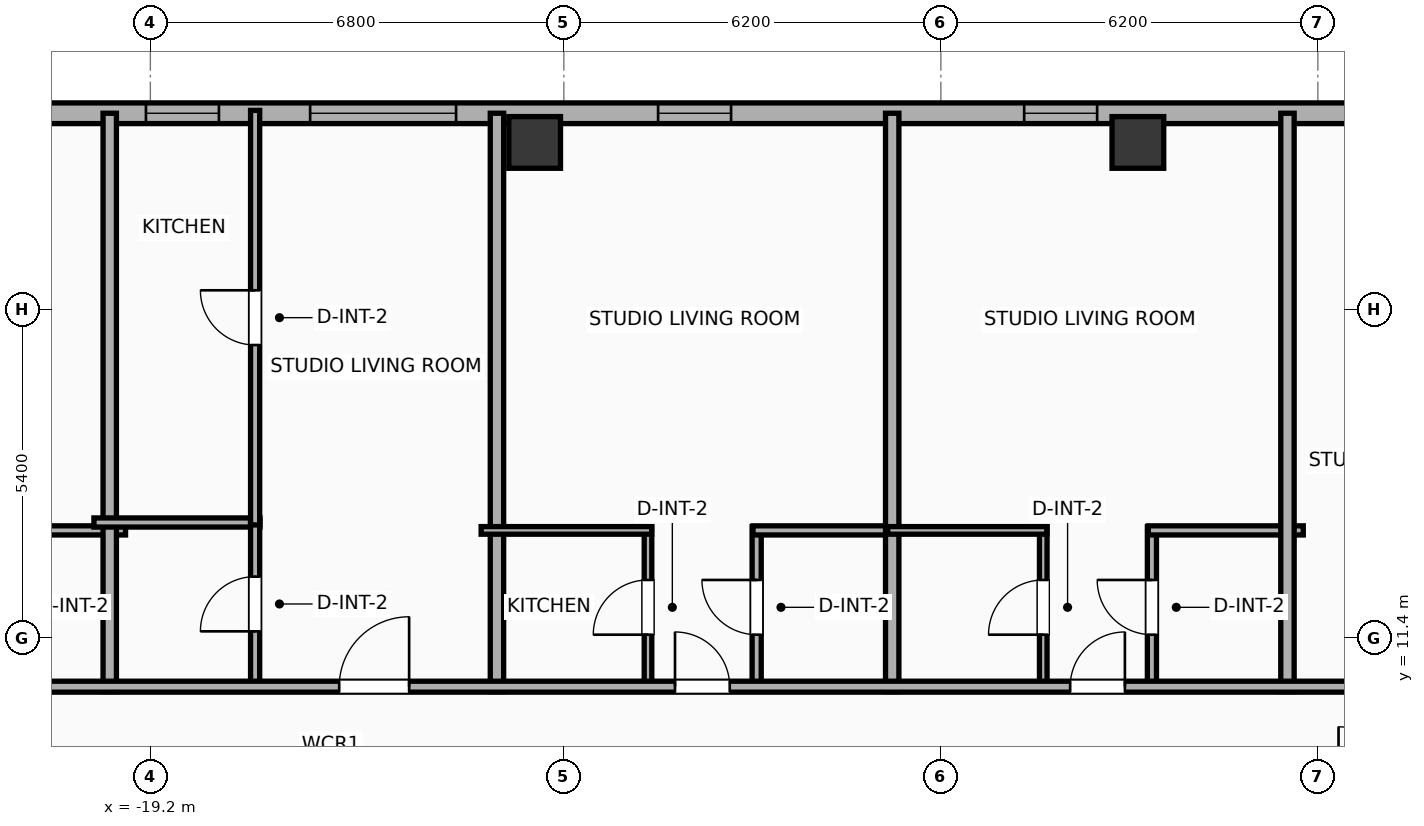
"""IFC4 building model, lengths in metres.
Left out: names, types, materials, properties, quantities, classifications, styles, units other than length and angle.
Written with IfcOpenShell. Run it as: python <this file> out.ifc"""

import sys

from ifc_helpers import new_model, si_unit, direction, frame, frame_2d, origin, origin_2d, place, context, subcontext, project, spatial, rectangle, hollow_rectangle, extrude, element, fill, save


model = new_model("IFC4")
c1 = context("Model", 3, precision=1e-05, world=origin(), true_north=direction((0.0, 1.0)))
c2 = subcontext(c1, "Body", "Model", "MODEL_VIEW")
j1 = project(units=[si_unit("LENGTHUNIT", "METRE"), si_unit("PLANEANGLEUNIT", "RADIAN")], contexts=[c1])
p1 = place(None, origin())
s1 = spatial("IfcSite", under=j1, at=p1, CompositionType="ELEMENT")
p2 = place(p1, origin())
s2 = spatial("IfcBuilding", under=s1, at=p2, CompositionType="ELEMENT")
p3 = place(p2, frame((0.0, 0.0, 247.0)))
s3 = spatial("IfcBuildingStorey", under=s2, at=p3, CompositionType="ELEMENT", Elevation=247.0)
for number, where, z_axis, x_axis in (
    (1, (-2.96, 19.55, 0.0), (0.0, 0.0, 1.0), (1.0, 0.0, 0.0)),
    (2, (-12.88, 19.55, 0.0), (0.0, 0.0, 1.0), (1.0, 0.0, 0.0)),
):
    element("IfcColumn", number, at=place(p3, frame(where, z_axis=z_axis, x_axis=x_axis)), inside=s3, PredefinedType="COLUMN", context=c2, shape_type="SweptSolid", body=[
        extrude(hollow_rectangle(XDim=0.85, YDim=0.85, WallThickness=0.028, at=origin_2d()), origin(), (0.0, 0.0, 1.0), 3.9),
    ])
p4 = place(p3, frame((-22.783, 20.03, 0.0), z_axis=(0.0, 0.0, 1.0), x_axis=(1.0, 0.0, 0.0)))
e3 = element("IfcWall", 3, at=p4, inside=s3, PredefinedType="ELEMENTEDWALL", context=c2, shape_type="SweptSolid", body=[
    extrude(rectangle(XDim=49.566, YDim=0.34, at=frame_2d((24.783, 0.0))), origin(), (0.0, 0.0, 1.0), 3.65),
])
p5 = place(p4, frame((6.211, 0.0, 0.75)))
e4 = element("IfcOpeningElement", 4, at=p5, cuts=e3, PredefinedType="OPENING", context=c2, shape_type="SweptSolid", body=[
    extrude(rectangle(XDim=2.4, YDim=2.1, at=frame_2d((1.2, 1.05))), frame((0.0, 0.18, 0.0), z_axis=(0.0, -1.0, 0.0), x_axis=(1.0, 0.0, 0.0)), (0.0, 0.0, 1.0), 0.36),
])
p6 = place(p4, frame((23.583, 0.0, 0.75)))
e5 = element("IfcOpeningElement", 5, at=p6, cuts=e3, PredefinedType="OPENING", context=c2, shape_type="SweptSolid", body=[
    extrude(rectangle(XDim=2.4, YDim=2.1, at=frame_2d((1.2, 1.05))), frame((0.0, 0.18, 0.0), z_axis=(0.0, -1.0, 0.0), x_axis=(1.0, 0.0, 0.0)), (0.0, 0.0, 1.0), 0.36),
])
p7 = place(p4, frame((41.756, 0.0, 0.75)))
e6 = element("IfcOpeningElement", 6, at=p7, cuts=e3, PredefinedType="OPENING", context=c2, shape_type="SweptSolid", body=[
    extrude(rectangle(XDim=2.4, YDim=2.1, at=frame_2d((1.2, 1.05))), frame((0.0, 0.18, 0.0), z_axis=(0.0, -1.0, 0.0), x_axis=(1.0, 0.0, 0.0)), (0.0, 0.0, 1.0), 0.36),
])
p8 = place(p4, frame((3.511, 0.0, 0.75)))
e7 = element("IfcOpeningElement", 7, at=p8, cuts=e3, PredefinedType="OPENING", context=c2, shape_type="SweptSolid", body=[
    extrude(rectangle(XDim=1.2, YDim=2.05, at=frame_2d((0.6, 1.025))), frame((0.0, 0.18, 0.0), z_axis=(0.0, -1.0, 0.0), x_axis=(1.0, 0.0, 0.0)), (0.0, 0.0, 1.0), 0.36),
])
p9 = place(p4, frame((11.933, 0.0, 0.75)))
e8 = element("IfcOpeningElement", 8, at=p9, cuts=e3, PredefinedType="OPENING", context=c2, shape_type="SweptSolid", body=[
    extrude(rectangle(XDim=1.2, YDim=2.05, at=frame_2d((0.6, 1.025))), frame((0.0, 0.18, 0.0), z_axis=(0.0, -1.0, 0.0), x_axis=(1.0, 0.0, 0.0)), (0.0, 0.0, 1.0), 0.36),
])
p10 = place(p4, frame((17.953, 0.0, 0.75)))
e9 = element("IfcOpeningElement", 9, at=p10, cuts=e3, PredefinedType="OPENING", context=c2, shape_type="SweptSolid", body=[
    extrude(rectangle(XDim=1.2, YDim=2.05, at=frame_2d((0.6, 1.025))), frame((0.0, 0.18, 0.0), z_axis=(0.0, -1.0, 0.0), x_axis=(1.0, 0.0, 0.0)), (0.0, 0.0, 1.0), 0.36),
])
p11 = place(p4, frame((27.018, 0.0, 0.75)))
e10 = element("IfcOpeningElement", 10, at=p11, cuts=e3, PredefinedType="OPENING", context=c2, shape_type="SweptSolid", body=[
    extrude(rectangle(XDim=1.2, YDim=2.05, at=frame_2d((0.6, 1.025))), frame((0.0, 0.18, 0.0), z_axis=(0.0, -1.0, 0.0), x_axis=(1.0, 0.0, 0.0)), (0.0, 0.0, 1.0), 0.36),
])
p12 = place(p4, frame((30.368, 0.0, 0.75)))
e11 = element("IfcOpeningElement", 11, at=p12, cuts=e3, PredefinedType="OPENING", context=c2, shape_type="SweptSolid", body=[
    extrude(rectangle(XDim=1.2, YDim=2.05, at=frame_2d((0.6, 1.025))), frame((0.0, 0.18, 0.0), z_axis=(0.0, -1.0, 0.0), x_axis=(1.0, 0.0, 0.0)), (0.0, 0.0, 1.0), 0.36),
])
p13 = place(p4, frame((33.378, 0.0, 0.75)))
e12 = element("IfcOpeningElement", 12, at=p13, cuts=e3, PredefinedType="OPENING", context=c2, shape_type="SweptSolid", body=[
    extrude(rectangle(XDim=1.2, YDim=2.05, at=frame_2d((0.6, 1.025))), frame((0.0, 0.18, 0.0), z_axis=(0.0, -1.0, 0.0), x_axis=(1.0, 0.0, 0.0)), (0.0, 0.0, 1.0), 0.36),
])
p14 = place(p4, frame((37.639, 0.0, 0.75)))
e13 = element("IfcOpeningElement", 13, at=p14, cuts=e3, PredefinedType="OPENING", context=c2, shape_type="SweptSolid", body=[
    extrude(rectangle(XDim=1.2, YDim=2.05, at=frame_2d((0.6, 1.025))), frame((0.0, 0.18, 0.0), z_axis=(0.0, -1.0, 0.0), x_axis=(1.0, 0.0, 0.0)), (0.0, 0.0, 1.0), 0.36),
])
p15 = place(p4, frame((45.25, 0.0, 0.75)))
e14 = element("IfcOpeningElement", 14, at=p15, cuts=e3, PredefinedType="OPENING", context=c2, shape_type="SweptSolid", body=[
    extrude(rectangle(XDim=1.2, YDim=2.05, at=frame_2d((0.6, 1.025))), frame((0.0, 0.18, 0.0), z_axis=(0.0, -1.0, 0.0), x_axis=(1.0, 0.0, 0.0)), (0.0, 0.0, 1.0), 0.36),
])
p16 = place(p4, frame((47.292, 0.0, 0.75)))
e15 = element("IfcOpeningElement", 15, at=p16, cuts=e3, PredefinedType="OPENING", context=c2, shape_type="SweptSolid", body=[
    extrude(rectangle(XDim=1.2, YDim=2.05, at=frame_2d((0.6, 1.025))), frame((0.0, 0.18, 0.0), z_axis=(0.0, -1.0, 0.0), x_axis=(1.0, 0.0, 0.0)), (0.0, 0.0, 1.0), 0.36),
])
p17 = place(p3, frame((-22.133, 13.17, 0.0), z_axis=(0.0, 0.0, 1.0), x_axis=(1.0, 0.0, 0.0)))
e16 = element("IfcWall", 16, at=p17, inside=s3, PredefinedType="PLUMBINGWALL", context=c2, shape_type="SweptSolid", body=[
    extrude(rectangle(XDim=2.525, YDim=0.15, at=frame_2d((1.263, 0.0))), origin(), (0.0, 0.0, 1.0), 3.65),
])
p18 = place(p3, frame((-19.868, 10.52, 0.0), z_axis=(0.0, 0.0, 1.0), x_axis=(0.0, 1.0, 0.0)))
e17 = element("IfcWall", 17, at=p18, inside=s3, PredefinedType="PARTITIONING", context=c2, shape_type="SweptSolid", body=[
    extrude(rectangle(XDim=9.51, YDim=0.22, at=frame_2d((4.755, 0.0))), origin(), (0.0, 0.0, 1.0), 3.65),
])
p19 = place(p3, frame((-20.128, 13.3, 0.0), z_axis=(0.0, 0.0, 1.0), x_axis=(1.0, 0.0, 0.0)))
e18 = element("IfcWall", 18, at=p19, inside=s3, PredefinedType="PLUMBINGWALL", context=c2, shape_type="SweptSolid", body=[
    extrude(rectangle(XDim=2.731, YDim=0.15, at=frame_2d((1.365, 0.0))), origin(), (0.0, 0.0, 1.0), 3.65),
])
p20 = place(p3, frame((-17.477, 10.58, 0.0), z_axis=(0.0, 0.0, 1.0), x_axis=(0.0, 1.0, 0.0)))
e19 = element("IfcWall", 19, at=p20, inside=s3, PredefinedType="PLUMBINGWALL", context=c2, shape_type="SweptSolid", body=[
    extrude(rectangle(XDim=2.76, YDim=0.15, at=frame_2d((1.38, 0.0))), origin(), (0.0, 0.0, 1.0), 3.65),
])
p21 = place(p20, frame((0.93, 0.0, 0.0)))
e20 = element("IfcOpeningElement", 20, at=p21, cuts=e19, PredefinedType="OPENING", context=c2, shape_type="SweptSolid", body=[
    extrude(rectangle(XDim=0.9, YDim=2.05, at=frame_2d((0.45, 1.025))), frame((0.0, 0.085, 0.0), z_axis=(0.0, -1.0, 0.0), x_axis=(1.0, 0.0, 0.0)), (0.0, 0.0, 1.0), 0.17),
])
p22 = place(p3, frame((-17.477, 13.26, 0.0), z_axis=(0.0, 0.0, 1.0), x_axis=(0.0, 1.0, 0.0)))
e21 = element("IfcWall", 21, at=p22, inside=s3, PredefinedType="PLUMBINGWALL", context=c2, shape_type="SweptSolid", body=[
    extrude(rectangle(XDim=6.817, YDim=0.15, at=frame_2d((3.408, 0.0))), origin(), (0.0, 0.0, 1.0), 3.65),
])
p23 = place(p22, frame((2.958, 0.0, 0.0)))
e22 = element("IfcOpeningElement", 22, at=p23, cuts=e21, PredefinedType="OPENING", context=c2, shape_type="SweptSolid", body=[
    extrude(rectangle(XDim=0.9, YDim=2.05, at=frame_2d((0.45, 1.025))), frame((0.0, 0.085, 0.0), z_axis=(0.0, -1.0, 0.0), x_axis=(1.0, 0.0, 0.0)), (0.0, 0.0, 1.0), 0.17),
])
p24 = place(p3, frame((-13.5, 10.52, 0.0), z_axis=(0.0, 0.0, 1.0), x_axis=(0.0, 1.0, 0.0)))
e23 = element("IfcWall", 23, at=p24, inside=s3, PredefinedType="PARTITIONING", context=c2, shape_type="SweptSolid", body=[
    extrude(rectangle(XDim=9.51, YDim=0.22, at=frame_2d((4.755, 0.0))), origin(), (0.0, 0.0, 1.0), 3.65),
])
p25 = place(p3, frame((-11.016, 10.58, 0.0), z_axis=(0.0, 0.0, 1.0), x_axis=(0.0, 1.0, 0.0)))
e24 = element("IfcWall", 24, at=p25, inside=s3, PredefinedType="PARTITIONING", context=c2, shape_type="SweptSolid", body=[
    extrude(rectangle(XDim=2.65, YDim=0.125, at=frame_2d((1.325, 0.0))), origin(), (0.0, 0.0, 1.0), 3.65),
])
p26 = place(p25, frame((0.875, 0.0, 0.0)))
e25 = element("IfcOpeningElement", 25, at=p26, cuts=e24, PredefinedType="OPENING", context=c2, shape_type="SweptSolid", body=[
    extrude(rectangle(XDim=0.9, YDim=2.05, at=frame_2d((0.45, 1.025))), frame((0.0, 0.073, 0.0), z_axis=(0.0, -1.0, 0.0), x_axis=(1.0, 0.0, 0.0)), (0.0, 0.0, 1.0), 0.145),
])
p27 = place(p3, frame((-9.229, 10.58, 0.0), z_axis=(0.0, 0.0, 1.0), x_axis=(0.0, 1.0, 0.0)))
e26 = element("IfcWall", 26, at=p27, inside=s3, PredefinedType="PLUMBINGWALL", context=c2, shape_type="SweptSolid", body=[
    extrude(rectangle(XDim=2.65, YDim=0.15, at=frame_2d((1.325, 0.0))), origin(), (0.0, 0.0, 1.0), 3.65),
])
p28 = place(p27, frame((0.875, 0.0, 0.0)))
e27 = element("IfcOpeningElement", 27, at=p28, cuts=e26, PredefinedType="OPENING", context=c2, shape_type="SweptSolid", body=[
    extrude(rectangle(XDim=0.9, YDim=2.05, at=frame_2d((0.45, 1.025))), frame((0.0, 0.085, 0.0), z_axis=(0.0, -1.0, 0.0), x_axis=(1.0, 0.0, 0.0)), (0.0, 0.0, 1.0), 0.17),
])
p29 = place(p3, frame((-13.76, 13.17, 0.0), z_axis=(0.0, 0.0, 1.0), x_axis=(1.0, 0.0, 0.0)))
e28 = element("IfcWall", 28, at=p29, inside=s3, PredefinedType="PARTITIONING", context=c2, shape_type="SweptSolid", body=[
    extrude(rectangle(XDim=2.804, YDim=0.125, at=frame_2d((1.402, 0.0))), origin(), (0.0, 0.0, 1.0), 3.65),
])
p30 = place(p3, frame((-9.289, 13.17, 0.0), z_axis=(0.0, 0.0, 1.0), x_axis=(1.0, 0.0, 0.0)))
e29 = element("IfcWall", 29, at=p30, inside=s3, PredefinedType="PLUMBINGWALL", context=c2, shape_type="SweptSolid", body=[
    extrude(rectangle(XDim=2.364, YDim=0.15, at=frame_2d((1.182, 0.0))), origin(), (0.0, 0.0, 1.0), 3.65),
])
p31 = place(p3, frame((-7.0, 10.52, 0.0), z_axis=(0.0, 0.0, 1.0), x_axis=(0.0, 1.0, 0.0)))
e30 = element("IfcWall", 30, at=p31, inside=s3, PredefinedType="PARTITIONING", context=c2, shape_type="SweptSolid", body=[
    extrude(rectangle(XDim=9.51, YDim=0.22, at=frame_2d((4.755, 0.0))), origin(), (0.0, 0.0, 1.0), 3.65),
])
p32 = place(p3, frame((-4.516, 10.58, 0.0), z_axis=(0.0, 0.0, 1.0), x_axis=(0.0, 1.0, 0.0)))
e31 = element("IfcWall", 31, at=p32, inside=s3, PredefinedType="PARTITIONING", context=c2, shape_type="SweptSolid", body=[
    extrude(rectangle(XDim=2.65, YDim=0.125, at=frame_2d((1.325, 0.0))), origin(), (0.0, 0.0, 1.0), 3.65),
])
p33 = place(p32, frame((0.875, 0.0, 0.0)))
e32 = element("IfcOpeningElement", 32, at=p33, cuts=e31, PredefinedType="OPENING", context=c2, shape_type="SweptSolid", body=[
    extrude(rectangle(XDim=0.9, YDim=2.05, at=frame_2d((0.45, 1.025))), frame((0.0, 0.073, 0.0), z_axis=(0.0, -1.0, 0.0), x_axis=(1.0, 0.0, 0.0)), (0.0, 0.0, 1.0), 0.145),
])
p34 = place(p3, frame((-2.729, 10.58, 0.0), z_axis=(0.0, 0.0, 1.0), x_axis=(0.0, 1.0, 0.0)))
e33 = element("IfcWall", 33, at=p34, inside=s3, PredefinedType="PLUMBINGWALL", context=c2, shape_type="SweptSolid", body=[
    extrude(rectangle(XDim=2.65, YDim=0.15, at=frame_2d((1.325, 0.0))), origin(), (0.0, 0.0, 1.0), 3.65),
])
p35 = place(p34, frame((0.875, 0.0, 0.0)))
e34 = element("IfcOpeningElement", 34, at=p35, cuts=e33, PredefinedType="OPENING", context=c2, shape_type="SweptSolid", body=[
    extrude(rectangle(XDim=0.9, YDim=2.05, at=frame_2d((0.45, 1.025))), frame((0.0, 0.085, 0.0), z_axis=(0.0, -1.0, 0.0), x_axis=(1.0, 0.0, 0.0)), (0.0, 0.0, 1.0), 0.17),
])
p36 = place(p3, frame((-7.075, 13.17, 0.0), z_axis=(0.0, 0.0, 1.0), x_axis=(1.0, 0.0, 0.0)))
e35 = element("IfcWall", 35, at=p36, inside=s3, PredefinedType="PARTITIONING", context=c2, shape_type="SweptSolid", body=[
    extrude(rectangle(XDim=2.619, YDim=0.125, at=frame_2d((1.31, 0.0))), origin(), (0.0, 0.0, 1.0), 3.65),
])
p37 = place(p3, frame((-2.789, 13.17, 0.0), z_axis=(0.0, 0.0, 1.0), x_axis=(1.0, 0.0, 0.0)))
e36 = element("IfcWall", 36, at=p37, inside=s3, PredefinedType="PLUMBINGWALL", context=c2, shape_type="SweptSolid", body=[
    extrude(rectangle(XDim=2.549, YDim=0.15, at=frame_2d((1.274, 0.0))), origin(), (0.0, 0.0, 1.0), 3.65),
])
p38 = place(p3, frame((-0.5, 10.52, 0.0), z_axis=(0.0, 0.0, 1.0), x_axis=(0.0, 1.0, 0.0)))
e37 = element("IfcWall", 37, at=p38, inside=s3, PredefinedType="PARTITIONING", context=c2, shape_type="SweptSolid", body=[
    extrude(rectangle(XDim=9.51, YDim=0.22, at=frame_2d((4.755, 0.0))), origin(), (0.0, 0.0, 1.0), 3.65),
])
p39 = place(p3, frame((-26.23, 10.6, 0.0), z_axis=(0.0, 0.0, 1.0), x_axis=(1.0, 0.0, 0.0)))
e38 = element("IfcWall", 38, at=p39, inside=s3, PredefinedType="PARTITIONING", context=c2, shape_type="SweptSolid", body=[
    extrude(rectangle(XDim=56.46, YDim=0.18, at=frame_2d((28.23, 0.0))), origin(), (0.0, 0.0, 1.0), 3.65),
])
p40 = place(p39, frame((2.825, 0.0, 0.0)))
e39 = element("IfcOpeningElement", 39, at=p40, cuts=e38, PredefinedType="OPENING", context=c2, shape_type="SweptSolid", body=[
    extrude(rectangle(XDim=0.9, YDim=2.05, at=frame_2d((0.45, 1.025))), frame((0.0, 0.1, 0.0), z_axis=(0.0, -1.0, 0.0), x_axis=(1.0, 0.0, 0.0)), (0.0, 0.0, 1.0), 0.2),
])
p41 = place(p39, frame((10.135, 0.0, 0.0)))
e40 = element("IfcOpeningElement", 40, at=p41, cuts=e38, PredefinedType="OPENING", context=c2, shape_type="SweptSolid", body=[
    extrude(rectangle(XDim=1.15, YDim=2.05, at=frame_2d((0.575, 1.025))), frame((0.0, 0.1, 0.0), z_axis=(0.0, -1.0, 0.0), x_axis=(1.0, 0.0, 0.0)), (0.0, 0.0, 1.0), 0.2),
])
p42 = place(p39, frame((15.658, 0.0, 0.0)))
e41 = element("IfcOpeningElement", 41, at=p42, cuts=e38, PredefinedType="OPENING", context=c2, shape_type="SweptSolid", body=[
    extrude(rectangle(XDim=0.9, YDim=2.05, at=frame_2d((0.45, 1.025))), frame((0.0, 0.1, 0.0), z_axis=(0.0, -1.0, 0.0), x_axis=(1.0, 0.0, 0.0)), (0.0, 0.0, 1.0), 0.2),
])
p43 = place(p39, frame((22.156, 0.0, 0.0)))
e42 = element("IfcOpeningElement", 42, at=p43, cuts=e38, PredefinedType="OPENING", context=c2, shape_type="SweptSolid", body=[
    extrude(rectangle(XDim=0.9, YDim=2.05, at=frame_2d((0.45, 1.025))), frame((0.0, 0.1, 0.0), z_axis=(0.0, -1.0, 0.0), x_axis=(1.0, 0.0, 0.0)), (0.0, 0.0, 1.0), 0.2),
])
p44 = place(p39, frame((27.271, 0.0, 0.0)))
e43 = element("IfcOpeningElement", 43, at=p44, cuts=e38, PredefinedType="OPENING", context=c2, shape_type="SweptSolid", body=[
    extrude(rectangle(XDim=1.15, YDim=2.05, at=frame_2d((0.575, 1.025))), frame((0.0, 0.1, 0.0), z_axis=(0.0, -1.0, 0.0), x_axis=(1.0, 0.0, 0.0)), (0.0, 0.0, 1.0), 0.2),
])
p45 = place(p39, frame((33.628, 0.0, 0.0)))
e44 = element("IfcOpeningElement", 44, at=p45, cuts=e38, PredefinedType="OPENING", context=c2, shape_type="SweptSolid", body=[
    extrude(rectangle(XDim=1.15, YDim=2.05, at=frame_2d((0.575, 1.025))), frame((0.0, 0.1, 0.0), z_axis=(0.0, -1.0, 0.0), x_axis=(1.0, 0.0, 0.0)), (0.0, 0.0, 1.0), 0.2),
])
p46 = place(p39, frame((41.375, 0.0, 0.0)))
e45 = element("IfcOpeningElement", 45, at=p46, cuts=e38, PredefinedType="OPENING", context=c2, shape_type="SweptSolid", body=[
    extrude(rectangle(XDim=0.9, YDim=2.05, at=frame_2d((0.45, 1.025))), frame((0.0, 0.1, 0.0), z_axis=(0.0, -1.0, 0.0), x_axis=(1.0, 0.0, 0.0)), (0.0, 0.0, 1.0), 0.2),
])
p47 = place(p39, frame((45.796, 0.0, 0.0)))
e46 = element("IfcOpeningElement", 46, at=p47, cuts=e38, PredefinedType="OPENING", context=c2, shape_type="SweptSolid", body=[
    extrude(rectangle(XDim=1.15, YDim=2.05, at=frame_2d((0.575, 1.025))), frame((0.0, 0.1, 0.0), z_axis=(0.0, -1.0, 0.0), x_axis=(1.0, 0.0, 0.0)), (0.0, 0.0, 1.0), 0.2),
])
p48 = place(p39, frame((53.221, 0.0, 0.0)))
e47 = element("IfcOpeningElement", 47, at=p48, cuts=e38, PredefinedType="OPENING", context=c2, shape_type="SweptSolid", body=[
    extrude(rectangle(XDim=0.9, YDim=2.05, at=frame_2d((0.45, 1.025))), frame((0.0, 0.1, 0.0), z_axis=(0.0, -1.0, 0.0), x_axis=(1.0, 0.0, 0.0)), (0.0, 0.0, 1.0), 0.2),
])
p49 = place(p5, origin())
e48 = element("IfcWindow", 48, at=p49, inside=s3, PartitioningType="SINGLE_PANEL", PredefinedType="WINDOW", context=c2, shape_type="SweptSolid", body=[
    extrude(rectangle(XDim=2.4, YDim=2.1, at=frame_2d((1.2, 1.05))), frame((0.0, 0.03, 0.0), z_axis=(0.0, -1.0, 0.0), x_axis=(1.0, 0.0, 0.0)), (0.0, 0.0, 1.0), 0.06),
])
fill(e4, e48)
p50 = place(p8, origin())
e49 = element("IfcWindow", 49, at=p50, inside=s3, PartitioningType="SINGLE_PANEL", PredefinedType="WINDOW", context=c2, shape_type="SweptSolid", body=[
    extrude(rectangle(XDim=1.2, YDim=2.05, at=frame_2d((0.6, 1.025))), frame((0.0, 0.03, 0.0), z_axis=(0.0, -1.0, 0.0), x_axis=(1.0, 0.0, 0.0)), (0.0, 0.0, 1.0), 0.06),
])
fill(e7, e49)
p51 = place(p9, origin())
e50 = element("IfcWindow", 50, at=p51, inside=s3, PartitioningType="SINGLE_PANEL", PredefinedType="WINDOW", context=c2, shape_type="SweptSolid", body=[
    extrude(rectangle(XDim=1.2, YDim=2.05, at=frame_2d((0.6, 1.025))), frame((0.0, 0.03, 0.0), z_axis=(0.0, -1.0, 0.0), x_axis=(1.0, 0.0, 0.0)), (0.0, 0.0, 1.0), 0.06),
])
fill(e8, e50)
p52 = place(p10, origin())
e51 = element("IfcWindow", 51, at=p52, inside=s3, PartitioningType="SINGLE_PANEL", PredefinedType="WINDOW", context=c2, shape_type="SweptSolid", body=[
    extrude(rectangle(XDim=1.2, YDim=2.05, at=frame_2d((0.6, 1.025))), frame((0.0, 0.03, 0.0), z_axis=(0.0, -1.0, 0.0), x_axis=(1.0, 0.0, 0.0)), (0.0, 0.0, 1.0), 0.06),
])
fill(e9, e51)
p53 = place(p21, origin())
e52 = element("IfcDoor", 52, at=p53, inside=s3, OperationType="SINGLE_SWING_LEFT", PredefinedType="DOOR", context=c2, shape_type="SweptSolid", body=[
    extrude(rectangle(XDim=0.9, YDim=2.05, at=frame_2d((0.45, 1.025))), frame((0.0, 0.025, 0.0), z_axis=(0.0, -1.0, 0.0), x_axis=(1.0, 0.0, 0.0)), (0.0, 0.0, 1.0), 0.05),
])
fill(e20, e52)
p54 = place(p23, origin())
e53 = element("IfcDoor", 53, at=p54, inside=s3, OperationType="SINGLE_SWING_RIGHT", PredefinedType="DOOR", context=c2, shape_type="SweptSolid", body=[
    extrude(rectangle(XDim=0.9, YDim=2.05, at=frame_2d((0.45, 1.025))), frame((0.0, 0.025, 0.0), z_axis=(0.0, -1.0, 0.0), x_axis=(1.0, 0.0, 0.0)), (0.0, 0.0, 1.0), 0.05),
])
fill(e22, e53)
p55 = place(p26, origin())
e54 = element("IfcDoor", 54, at=p55, inside=s3, OperationType="SINGLE_SWING_LEFT", PredefinedType="DOOR", context=c2, shape_type="SweptSolid", body=[
    extrude(rectangle(XDim=0.9, YDim=2.05, at=frame_2d((0.45, 1.025))), frame((0.0, 0.025, 0.0), z_axis=(0.0, -1.0, 0.0), x_axis=(1.0, 0.0, 0.0)), (0.0, 0.0, 1.0), 0.05),
])
fill(e25, e54)
p56 = place(p28, origin())
e55 = element("IfcDoor", 55, at=p56, inside=s3, OperationType="SINGLE_SWING_RIGHT", PredefinedType="DOOR", context=c2, shape_type="SweptSolid", body=[
    extrude(rectangle(XDim=0.9, YDim=2.05, at=frame_2d((0.45, 1.025))), frame((0.0, 0.025, 0.0), z_axis=(0.0, -1.0, 0.0), x_axis=(1.0, 0.0, 0.0)), (0.0, 0.0, 1.0), 0.05),
])
fill(e27, e55)
p57 = place(p33, origin())
e56 = element("IfcDoor", 56, at=p57, inside=s3, OperationType="SINGLE_SWING_LEFT", PredefinedType="DOOR", context=c2, shape_type="SweptSolid", body=[
    extrude(rectangle(XDim=0.9, YDim=2.05, at=frame_2d((0.45, 1.025))), frame((0.0, 0.025, 0.0), z_axis=(0.0, -1.0, 0.0), x_axis=(1.0, 0.0, 0.0)), (0.0, 0.0, 1.0), 0.05),
])
fill(e32, e56)
p58 = place(p35, origin())
e57 = element("IfcDoor", 57, at=p58, inside=s3, OperationType="SINGLE_SWING_RIGHT", PredefinedType="DOOR", context=c2, shape_type="SweptSolid", body=[
    extrude(rectangle(XDim=0.9, YDim=2.05, at=frame_2d((0.45, 1.025))), frame((0.0, 0.025, 0.0), z_axis=(0.0, -1.0, 0.0), x_axis=(1.0, 0.0, 0.0)), (0.0, 0.0, 1.0), 0.05),
])
fill(e34, e57)
p59 = place(p41, origin())
e58 = element("IfcDoor", 58, at=p59, inside=s3, OperationType="SINGLE_SWING_RIGHT", PredefinedType="DOOR", context=c2, shape_type="SweptSolid", body=[
    extrude(rectangle(XDim=1.15, YDim=2.05, at=frame_2d((0.575, 1.025))), frame((0.0, 0.025, 0.0), z_axis=(0.0, -1.0, 0.0), x_axis=(1.0, 0.0, 0.0)), (0.0, 0.0, 1.0), 0.05),
])
fill(e40, e58)
p60 = place(p42, origin())
e59 = element("IfcDoor", 59, at=p60, inside=s3, OperationType="SINGLE_SWING_LEFT", PredefinedType="DOOR", context=c2, shape_type="SweptSolid", body=[
    extrude(rectangle(XDim=0.9, YDim=2.05, at=frame_2d((0.45, 1.025))), frame((0.0, 0.025, 0.0), z_axis=(0.0, -1.0, 0.0), x_axis=(1.0, 0.0, 0.0)), (0.0, 0.0, 1.0), 0.05),
])
fill(e41, e59)
p61 = place(p43, origin())
e60 = element("IfcDoor", 60, at=p61, inside=s3, OperationType="SINGLE_SWING_RIGHT", PredefinedType="DOOR", context=c2, shape_type="SweptSolid", body=[
    extrude(rectangle(XDim=0.9, YDim=2.05, at=frame_2d((0.45, 1.025))), frame((0.0, 0.025, 0.0), z_axis=(0.0, -1.0, 0.0), x_axis=(1.0, 0.0, 0.0)), (0.0, 0.0, 1.0), 0.05),
])
fill(e42, e60)
save(model, sys.argv[1])
